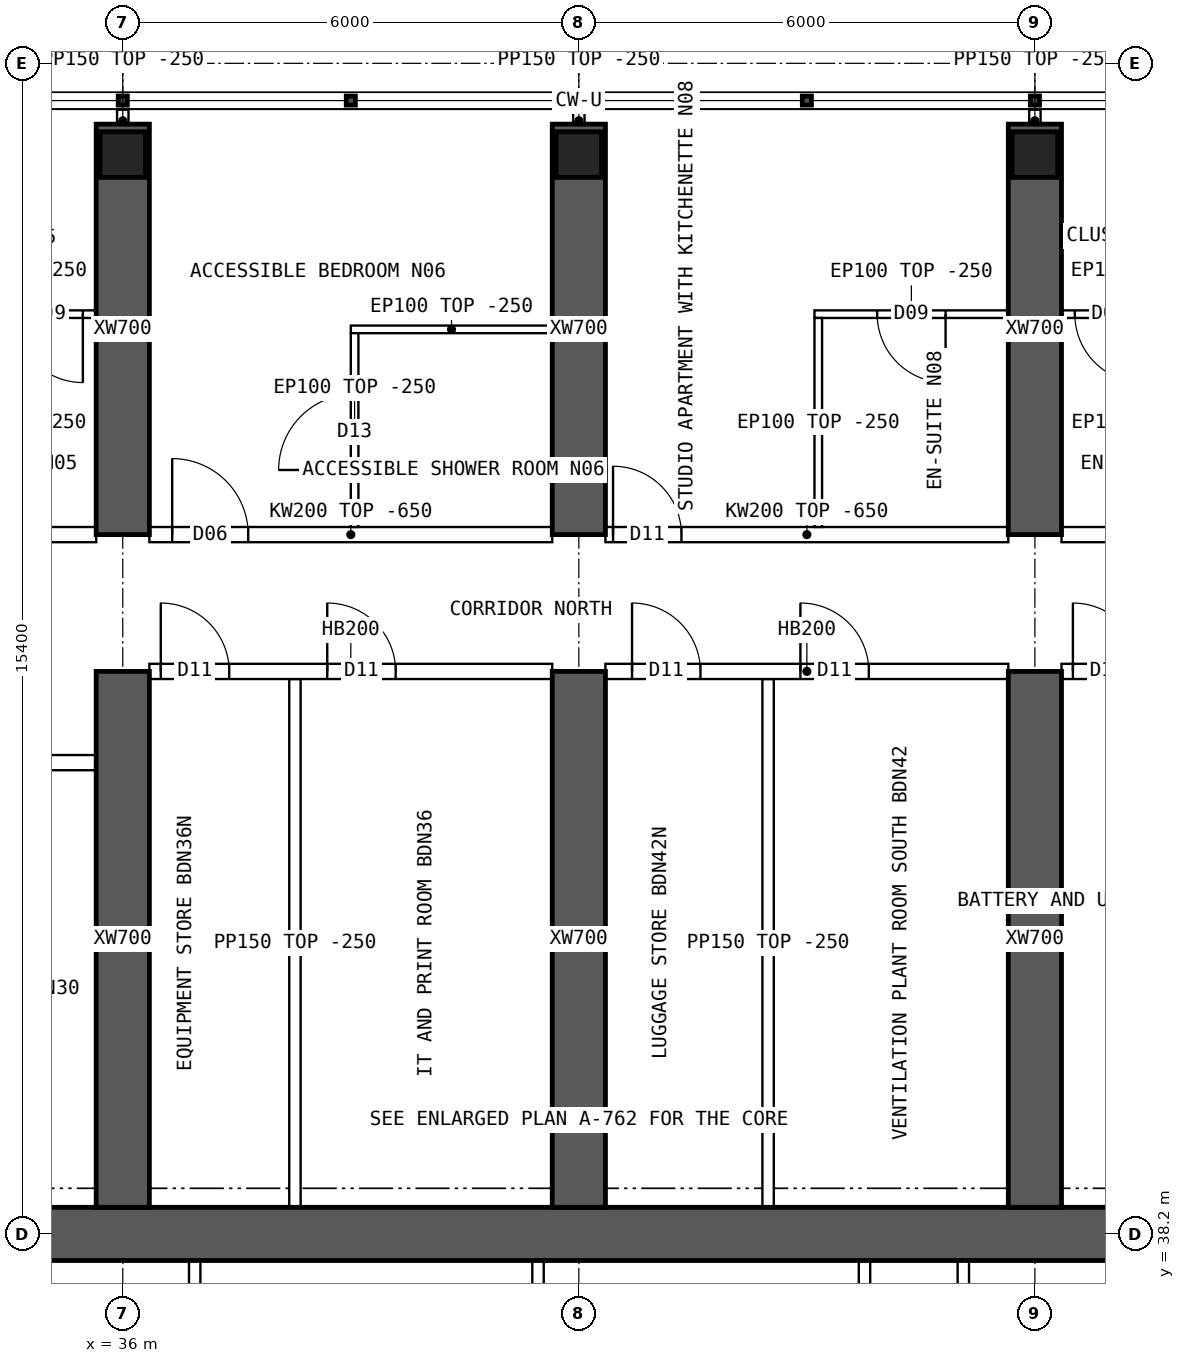
"""IFC4 building model, lengths in metres.
Left out: names, types, materials, properties, quantities, classifications, styles, units other than length and angle.
Written with IfcOpenShell. Run it as: python <this file> out.ifc"""

import sys

from ifc_helpers import new_model, si_unit, direction, frame, frame_2d, origin, origin_2d, place, context, subcontext, project, spatial, polyline, rectangle, hollow_rectangle, outline, extrude, element, fill, save


model = new_model("IFC4")
c1 = context("Model", 3, precision=1e-05, world=origin(), true_north=direction((0.0, 1.0)))
c2 = subcontext(c1, "Body", "Model", "MODEL_VIEW")
j1 = project(units=[si_unit("LENGTHUNIT", "METRE"), si_unit("PLANEANGLEUNIT", "RADIAN")], contexts=[c1])
p1 = place(None, origin())
s1 = spatial("IfcSite", under=j1, at=p1, CompositionType="ELEMENT")
p2 = place(p1, origin())
s2 = spatial("IfcBuilding", under=s1, at=p2, CompositionType="ELEMENT")
p3 = place(p2, frame((0.0, 0.0, 239.05)))
s3 = spatial("IfcBuildingStorey", under=s2, at=p3, CompositionType="ELEMENT", Elevation=239.05)
for number, where, z_axis, x_axis in (
    (1, (36.0, 52.4, 0.0), (0.0, 0.0, 1.0), (1.0, 0.0, 0.0)),
    (2, (42.0, 52.4, 0.0), (0.0, 0.0, 1.0), (1.0, 0.0, 0.0)),
    (3, (48.0, 52.4, 0.0), (0.0, 0.0, 1.0), (1.0, 0.0, 0.0)),
):
    element("IfcColumn", number, at=place(p3, frame(where, z_axis=z_axis, x_axis=x_axis)), inside=s3, PredefinedType="COLUMN", context=c2, shape_type="SweptSolid", body=[
        extrude(hollow_rectangle(XDim=0.6, YDim=0.6, WallThickness=0.06, at=origin_2d()), origin(), (0.0, 0.0, 1.0), 3.75),
    ])
p4 = place(p3, frame((18.0, 38.2, 0.0), z_axis=(0.0, 0.0, 1.0), x_axis=(1.0, 0.0, 0.0)))
e4 = element("IfcWall", 4, at=p4, inside=s3, PredefinedType="SHEAR", context=c2, shape_type="SweptSolid", body=[
    extrude(rectangle(XDim=48.0, YDim=0.7, at=frame_2d((24.0, 0.0))), origin(), (0.0, 0.0, 1.0), 3.75),
])
p5 = place(p3, frame((36.0, 47.4, 0.0), z_axis=(0.0, 0.0, 1.0), x_axis=(0.0, 1.0, 0.0)))
e5 = element("IfcWall", 5, at=p5, inside=s3, PredefinedType="SHEAR", context=c2, shape_type="SweptSolid", body=[
    extrude(rectangle(XDim=5.4, YDim=0.7, at=frame_2d((2.7, 0.0))), origin(), (0.0, 0.0, 1.0), 3.75),
])
p6 = place(p3, frame((36.0, 38.55, 0.0), z_axis=(0.0, 0.0, 1.0), x_axis=(0.0, 1.0, 0.0)))
e6 = element("IfcWall", 6, at=p6, inside=s3, PredefinedType="SHEAR", context=c2, shape_type="SweptSolid", body=[
    extrude(rectangle(XDim=7.05, YDim=0.7, at=frame_2d((3.525, 0.0))), origin(), (0.0, 0.0, 1.0), 3.75),
])
p7 = place(p3, frame((42.0, 47.4, 0.0), z_axis=(0.0, 0.0, 1.0), x_axis=(0.0, 1.0, 0.0)))
e7 = element("IfcWall", 7, at=p7, inside=s3, PredefinedType="SHEAR", context=c2, shape_type="SweptSolid", body=[
    extrude(rectangle(XDim=5.4, YDim=0.7, at=frame_2d((2.7, 0.0))), origin(), (0.0, 0.0, 1.0), 3.75),
])
p8 = place(p3, frame((42.0, 38.55, 0.0), z_axis=(0.0, 0.0, 1.0), x_axis=(0.0, 1.0, 0.0)))
e8 = element("IfcWall", 8, at=p8, inside=s3, PredefinedType="SHEAR", context=c2, shape_type="SweptSolid", body=[
    extrude(rectangle(XDim=7.05, YDim=0.7, at=frame_2d((3.525, 0.0))), origin(), (0.0, 0.0, 1.0), 3.75),
])
p9 = place(p3, frame((48.0, 47.4, 0.0), z_axis=(0.0, 0.0, 1.0), x_axis=(0.0, 1.0, 0.0)))
e9 = element("IfcWall", 9, at=p9, inside=s3, PredefinedType="SHEAR", context=c2, shape_type="SweptSolid", body=[
    extrude(rectangle(XDim=5.4, YDim=0.7, at=frame_2d((2.7, 0.0))), origin(), (0.0, 0.0, 1.0), 3.75),
])
p10 = place(p3, frame((48.0, 38.55, 0.0), z_axis=(0.0, 0.0, 1.0), x_axis=(0.0, 1.0, 0.0)))
e10 = element("IfcWall", 10, at=p10, inside=s3, PredefinedType="SHEAR", context=c2, shape_type="SweptSolid", body=[
    extrude(rectangle(XDim=7.05, YDim=0.7, at=frame_2d((3.525, 0.0))), origin(), (0.0, 0.0, 1.0), 3.75),
])
for number, where, z_axis, x_axis in (
    (11, (36.946, 34.75, 0.0), (0.0, 0.0, 1.0), (0.0, 1.0, 0.0)),
    (12, (41.463, 34.75, 0.0), (0.0, 0.0, 1.0), (0.0, 1.0, 0.0)),
    (13, (45.758, 34.75, 0.0), (0.0, 0.0, 1.0), (0.0, 1.0, 0.0)),
    (14, (47.058, 34.75, 0.0), (0.0, 0.0, 1.0), (0.0, 1.0, 0.0)),
):
    element("IfcWall", number, at=place(p3, frame(where, z_axis=z_axis, x_axis=x_axis)), inside=s3, PredefinedType="SOLIDWALL", context=c2, shape_type="SweptSolid", body=[
        extrude(rectangle(XDim=3.1, YDim=0.15, at=frame_2d((1.55, 0.0))), origin(), (0.0, 0.0, 1.0), 3.5),
    ])
p11 = place(p3, frame((30.35, 47.4, 0.0), z_axis=(0.0, 0.0, 1.0), x_axis=(1.0, 0.0, 0.0)))
e15 = element("IfcWall", 15, at=p11, inside=s3, PredefinedType="SOLIDWALL", context=c2, shape_type="SweptSolid", body=[
    extrude(outline(polyline([(0.0, 0.0), (5.3, 0.0), (5.3, 3.1), (0.0, 3.1), (0.0, 0.0)])), frame((0.0, 0.1, 0.0), z_axis=(0.0, -1.0, 0.0), x_axis=(1.0, 0.0, 0.0)), (0.0, 0.0, 1.0), 0.2),
])
p12 = place(p11, frame((0.3, 0.0, 0.0)))
e16 = element("IfcOpeningElement", 16, at=p12, cuts=e15, PredefinedType="OPENING", context=c2, shape_type="SweptSolid", body=[
    extrude(rectangle(XDim=0.9, YDim=2.1, at=frame_2d((0.45, 1.05))), frame((0.0, 0.11, 0.0), z_axis=(0.0, -1.0, 0.0), x_axis=(1.0, 0.0, 0.0)), (0.0, 0.0, 1.0), 0.22),
])
p13 = place(p3, frame((36.35, 47.4, 0.0), z_axis=(0.0, 0.0, 1.0), x_axis=(1.0, 0.0, 0.0)))
e17 = element("IfcWall", 17, at=p13, inside=s3, PredefinedType="SOLIDWALL", context=c2, shape_type="SweptSolid", body=[
    extrude(outline(polyline([(0.0, 0.0), (5.3, 0.0), (5.3, 3.1), (0.0, 3.1), (0.0, 0.0)])), frame((0.0, 0.1, 0.0), z_axis=(0.0, -1.0, 0.0), x_axis=(1.0, 0.0, 0.0)), (0.0, 0.0, 1.0), 0.2),
])
p14 = place(p13, frame((0.3, 0.0, 0.0)))
e18 = element("IfcOpeningElement", 18, at=p14, cuts=e17, PredefinedType="OPENING", context=c2, shape_type="SweptSolid", body=[
    extrude(rectangle(XDim=1.0, YDim=2.1, at=frame_2d((0.5, 1.05))), frame((0.0, 0.11, 0.0), z_axis=(0.0, -1.0, 0.0), x_axis=(1.0, 0.0, 0.0)), (0.0, 0.0, 1.0), 0.22),
])
p15 = place(p3, frame((36.35, 45.6, 0.0), z_axis=(0.0, 0.0, 1.0), x_axis=(1.0, 0.0, 0.0)))
e19 = element("IfcWall", 19, at=p15, inside=s3, PredefinedType="SOLIDWALL", context=c2, shape_type="SweptSolid", body=[
    extrude(rectangle(XDim=5.3, YDim=0.2, at=frame_2d((2.65, 0.0))), origin(), (0.0, 0.0, 1.0), 3.5),
])
p16 = place(p15, frame((0.15, 0.0, 0.0)))
e20 = element("IfcOpeningElement", 20, at=p16, cuts=e19, PredefinedType="OPENING", context=c2, shape_type="SweptSolid", body=[
    extrude(rectangle(XDim=0.9, YDim=2.1, at=frame_2d((0.45, 1.05))), frame((0.0, 0.11, 0.0), z_axis=(0.0, -1.0, 0.0), x_axis=(1.0, 0.0, 0.0)), (0.0, 0.0, 1.0), 0.22),
])
p17 = place(p15, frame((2.34, 0.0, 0.0)))
e21 = element("IfcOpeningElement", 21, at=p17, cuts=e19, PredefinedType="OPENING", context=c2, shape_type="SweptSolid", body=[
    extrude(rectangle(XDim=0.9, YDim=2.1, at=frame_2d((0.45, 1.05))), frame((0.0, 0.11, 0.0), z_axis=(0.0, -1.0, 0.0), x_axis=(1.0, 0.0, 0.0)), (0.0, 0.0, 1.0), 0.22),
])
p18 = place(p3, frame((42.35, 47.4, 0.0), z_axis=(0.0, 0.0, 1.0), x_axis=(1.0, 0.0, 0.0)))
e22 = element("IfcWall", 22, at=p18, inside=s3, PredefinedType="SOLIDWALL", context=c2, shape_type="SweptSolid", body=[
    extrude(outline(polyline([(0.0, 0.0), (5.3, 0.0), (5.3, 3.1), (0.0, 3.1), (0.0, 0.0)])), frame((0.0, 0.1, 0.0), z_axis=(0.0, -1.0, 0.0), x_axis=(1.0, 0.0, 0.0)), (0.0, 0.0, 1.0), 0.2),
])
p19 = place(p18, frame((0.1, 0.0, 0.0)))
e23 = element("IfcOpeningElement", 23, at=p19, cuts=e22, PredefinedType="OPENING", context=c2, shape_type="SweptSolid", body=[
    extrude(rectangle(XDim=0.9, YDim=2.1, at=frame_2d((0.45, 1.05))), frame((0.0, 0.11, 0.0), z_axis=(0.0, -1.0, 0.0), x_axis=(1.0, 0.0, 0.0)), (0.0, 0.0, 1.0), 0.22),
])
p20 = place(p3, frame((42.35, 45.6, 0.0), z_axis=(0.0, 0.0, 1.0), x_axis=(1.0, 0.0, 0.0)))
e24 = element("IfcWall", 24, at=p20, inside=s3, PredefinedType="SOLIDWALL", context=c2, shape_type="SweptSolid", body=[
    extrude(rectangle(XDim=5.3, YDim=0.2, at=frame_2d((2.65, 0.0))), origin(), (0.0, 0.0, 1.0), 3.5),
])
p21 = place(p20, frame((0.35, 0.0, 0.0)))
e25 = element("IfcOpeningElement", 25, at=p21, cuts=e24, PredefinedType="OPENING", context=c2, shape_type="SweptSolid", body=[
    extrude(rectangle(XDim=0.9, YDim=2.1, at=frame_2d((0.45, 1.05))), frame((0.0, 0.11, 0.0), z_axis=(0.0, -1.0, 0.0), x_axis=(1.0, 0.0, 0.0)), (0.0, 0.0, 1.0), 0.22),
])
p22 = place(p20, frame((2.565, 0.0, 0.0)))
e26 = element("IfcOpeningElement", 26, at=p22, cuts=e24, PredefinedType="OPENING", context=c2, shape_type="SweptSolid", body=[
    extrude(rectangle(XDim=0.9, YDim=2.1, at=frame_2d((0.45, 1.05))), frame((0.0, 0.11, 0.0), z_axis=(0.0, -1.0, 0.0), x_axis=(1.0, 0.0, 0.0)), (0.0, 0.0, 1.0), 0.22),
])
p23 = place(p3, frame((48.35, 47.4, 0.0), z_axis=(0.0, 0.0, 1.0), x_axis=(1.0, 0.0, 0.0)))
e27 = element("IfcWall", 27, at=p23, inside=s3, PredefinedType="SOLIDWALL", context=c2, shape_type="SweptSolid", body=[
    extrude(outline(polyline([(0.0, 0.0), (5.3, 0.0), (5.3, 3.1), (0.0, 3.1), (0.0, 0.0)])), frame((0.0, 0.1, 0.0), z_axis=(0.0, -1.0, 0.0), x_axis=(1.0, 0.0, 0.0)), (0.0, 0.0, 1.0), 0.2),
])
p24 = place(p23, frame((1.3, 0.0, 0.0)))
e28 = element("IfcOpeningElement", 28, at=p24, cuts=e27, PredefinedType="OPENING", context=c2, shape_type="SweptSolid", body=[
    extrude(rectangle(XDim=0.9, YDim=2.1, at=frame_2d((0.45, 1.05))), frame((0.0, 0.11, 0.0), z_axis=(0.0, -1.0, 0.0), x_axis=(1.0, 0.0, 0.0)), (0.0, 0.0, 1.0), 0.22),
])
p25 = place(p23, frame((2.825, 0.0, 0.0)))
e29 = element("IfcOpeningElement", 29, at=p25, cuts=e27, PredefinedType="OPENING", context=c2, shape_type="SweptSolid", body=[
    extrude(rectangle(XDim=0.9, YDim=2.1, at=frame_2d((0.45, 1.05))), frame((0.0, 0.11, 0.0), z_axis=(0.0, -1.0, 0.0), x_axis=(1.0, 0.0, 0.0)), (0.0, 0.0, 1.0), 0.22),
])
p26 = place(p3, frame((48.35, 45.6, 0.0), z_axis=(0.0, 0.0, 1.0), x_axis=(1.0, 0.0, 0.0)))
e30 = element("IfcWall", 30, at=p26, inside=s3, PredefinedType="SOLIDWALL", context=c2, shape_type="SweptSolid", body=[
    extrude(rectangle(XDim=5.3, YDim=0.2, at=frame_2d((2.65, 0.0))), origin(), (0.0, 0.0, 1.0), 3.5),
])
p27 = place(p26, frame((0.15, 0.0, 0.0)))
e31 = element("IfcOpeningElement", 31, at=p27, cuts=e30, PredefinedType="OPENING", context=c2, shape_type="SweptSolid", body=[
    extrude(rectangle(XDim=0.9, YDim=2.1, at=frame_2d((0.45, 1.05))), frame((0.0, 0.11, 0.0), z_axis=(0.0, -1.0, 0.0), x_axis=(1.0, 0.0, 0.0)), (0.0, 0.0, 1.0), 0.22),
])
p28 = place(p26, frame((2.16, 0.0, 0.0)))
e32 = element("IfcOpeningElement", 32, at=p28, cuts=e30, PredefinedType="OPENING", context=c2, shape_type="SweptSolid", body=[
    extrude(rectangle(XDim=0.9, YDim=2.1, at=frame_2d((0.45, 1.05))), frame((0.0, 0.11, 0.0), z_axis=(0.0, -1.0, 0.0), x_axis=(1.0, 0.0, 0.0)), (0.0, 0.0, 1.0), 0.22),
])
p29 = place(p3, frame((34.4, 50.3, 0.0), z_axis=(0.0, 0.0, 1.0), x_axis=(1.0, 0.0, 0.0)))
e33 = element("IfcWall", 33, at=p29, inside=s3, PredefinedType="PARTITIONING", context=c2, shape_type="SweptSolid", body=[
    extrude(rectangle(XDim=1.25, YDim=0.1, at=frame_2d((0.625, 0.0))), origin(), (0.0, 0.0, 1.0), 3.5),
])
p30 = place(p29, frame((0.175, 0.0, 0.0)))
e34 = element("IfcOpeningElement", 34, at=p30, cuts=e33, PredefinedType="OPENING", context=c2, shape_type="SweptSolid", body=[
    extrude(rectangle(XDim=0.9, YDim=2.1, at=frame_2d((0.45, 1.05))), frame((0.0, 0.06, 0.0), z_axis=(0.0, -1.0, 0.0), x_axis=(1.0, 0.0, 0.0)), (0.0, 0.0, 1.0), 0.12),
])
p31 = place(p3, frame((39.0, 50.1, 0.0), z_axis=(0.0, 0.0, 1.0), x_axis=(1.0, 0.0, 0.0)))
e35 = element("IfcWall", 35, at=p31, inside=s3, PredefinedType="PARTITIONING", context=c2, shape_type="SweptSolid", body=[
    extrude(rectangle(XDim=2.65, YDim=0.1, at=frame_2d((1.325, 0.0))), origin(), (0.0, 0.0, 1.0), 3.5),
])
p32 = place(p3, frame((39.05, 50.05, 0.0), z_axis=(0.0, 0.0, 1.0), x_axis=(0.0, -1.0, 0.0)))
e36 = element("IfcWall", 36, at=p32, inside=s3, PredefinedType="PARTITIONING", context=c2, shape_type="SweptSolid", body=[
    extrude(outline(polyline([(0.0, 0.0), (2.55, 0.0), (2.55, 3.1), (2.502, 3.1), (2.5, 3.5), (0.0, 3.5), (0.0, 0.0)])), frame((0.0, 0.05, 0.0), z_axis=(0.0, -1.0, 0.0), x_axis=(1.0, 0.0, 0.0)), (0.0, 0.0, 1.0), 0.1),
])
p33 = place(p32, frame((0.8, 0.0, 0.0)))
e37 = element("IfcOpeningElement", 37, at=p33, cuts=e36, PredefinedType="OPENING", context=c2, shape_type="SweptSolid", body=[
    extrude(rectangle(XDim=1.0, YDim=2.1, at=frame_2d((0.5, 1.05))), frame((0.0, 0.06, 0.0), z_axis=(0.0, -1.0, 0.0), x_axis=(1.0, 0.0, 0.0)), (0.0, 0.0, 1.0), 0.12),
])
p34 = place(p3, frame((45.1, 50.3, 0.0), z_axis=(0.0, 0.0, 1.0), x_axis=(1.0, 0.0, 0.0)))
e38 = element("IfcWall", 38, at=p34, inside=s3, PredefinedType="PARTITIONING", context=c2, shape_type="SweptSolid", body=[
    extrude(rectangle(XDim=2.55, YDim=0.1, at=frame_2d((1.275, 0.0))), origin(), (0.0, 0.0, 1.0), 3.5),
])
p35 = place(p34, frame((0.825, 0.0, 0.0)))
e39 = element("IfcOpeningElement", 39, at=p35, cuts=e38, PredefinedType="OPENING", context=c2, shape_type="SweptSolid", body=[
    extrude(rectangle(XDim=0.9, YDim=2.1, at=frame_2d((0.45, 1.05))), frame((0.0, 0.06, 0.0), z_axis=(0.0, -1.0, 0.0), x_axis=(1.0, 0.0, 0.0)), (0.0, 0.0, 1.0), 0.12),
])
p36 = place(p3, frame((45.15, 50.25, 0.0), z_axis=(0.0, 0.0, 1.0), x_axis=(0.0, -1.0, 0.0)))
e40 = element("IfcWall", 40, at=p36, inside=s3, PredefinedType="PARTITIONING", context=c2, shape_type="SweptSolid", body=[
    extrude(outline(polyline([(0.0, 0.0), (2.75, 0.0), (2.75, 3.1), (2.702, 3.1), (2.7, 3.5), (0.0, 3.5), (0.0, 0.0)])), frame((0.0, 0.05, 0.0), z_axis=(0.0, -1.0, 0.0), x_axis=(1.0, 0.0, 0.0)), (0.0, 0.0, 1.0), 0.1),
])
p37 = place(p3, frame((48.35, 50.3, 0.0), z_axis=(0.0, 0.0, 1.0), x_axis=(1.0, 0.0, 0.0)))
e41 = element("IfcWall", 41, at=p37, inside=s3, PredefinedType="PARTITIONING", context=c2, shape_type="SweptSolid", body=[
    extrude(rectangle(XDim=1.25, YDim=0.1, at=frame_2d((0.625, 0.0))), origin(), (0.0, 0.0, 1.0), 3.5),
])
p38 = place(p37, frame((0.175, 0.0, 0.0)))
e42 = element("IfcOpeningElement", 42, at=p38, cuts=e41, PredefinedType="OPENING", context=c2, shape_type="SweptSolid", body=[
    extrude(rectangle(XDim=0.9, YDim=2.1, at=frame_2d((0.45, 1.05))), frame((0.0, 0.06, 0.0), z_axis=(0.0, -1.0, 0.0), x_axis=(1.0, 0.0, 0.0)), (0.0, 0.0, 1.0), 0.12),
])
p39 = place(p3, frame((30.35, 44.4, 0.0), z_axis=(0.0, 0.0, 1.0), x_axis=(1.0, 0.0, 0.0)))
e43 = element("IfcWall", 43, at=p39, inside=s3, PredefinedType="SOLIDWALL", context=c2, shape_type="SweptSolid", body=[
    extrude(rectangle(XDim=5.3, YDim=0.2, at=frame_2d((2.65, 0.0))), origin(), (0.0, 0.0, 1.0), 3.5),
])
p40 = place(p39, frame((0.8, 0.0, 0.0)))
e44 = element("IfcOpeningElement", 44, at=p40, cuts=e43, PredefinedType="OPENING", context=c2, shape_type="SweptSolid", body=[
    extrude(rectangle(XDim=1.0, YDim=2.1, at=frame_2d((0.5, 1.05))), frame((0.0, 0.11, 0.0), z_axis=(0.0, -1.0, 0.0), x_axis=(1.0, 0.0, 0.0)), (0.0, 0.0, 1.0), 0.22),
])
for number, where, z_axis, x_axis in (
    (45, (38.265, 38.55, 0.0), (0.0, 0.0, 1.0), (0.0, 1.0, 0.0)),
    (46, (44.49, 38.55, 0.0), (0.0, 0.0, 1.0), (0.0, 1.0, 0.0)),
):
    element("IfcWall", number, at=place(p3, frame(where, z_axis=z_axis, x_axis=x_axis)), inside=s3, PredefinedType="PARTITIONING", context=c2, shape_type="SweptSolid", body=[
        extrude(rectangle(XDim=6.95, YDim=0.15, at=frame_2d((3.475, 0.0))), origin(), (0.0, 0.0, 1.0), 3.5),
    ])
for number, where, z_axis, x_axis in (
    (47, (36.0, 52.7, 0.0), (0.0, 0.0, 1.0), (0.0, 1.0, 0.0)),
    (48, (42.0, 52.7, 0.0), (0.0, 0.0, 1.0), (0.0, 1.0, 0.0)),
    (49, (48.0, 52.7, 0.0), (0.0, 0.0, 1.0), (0.0, 1.0, 0.0)),
):
    element("IfcWall", number, at=place(p3, frame(where, z_axis=z_axis, x_axis=x_axis)), inside=s3, PredefinedType="PARTITIONING", context=c2, shape_type="SweptSolid", body=[
        extrude(rectangle(XDim=0.29, YDim=0.15, at=frame_2d((0.145, 0.0))), origin(), (0.0, 0.0, 1.0), 3.5),
    ])
p41 = place(p30, origin())
e50 = element("IfcDoor", 50, at=p41, inside=s3, OperationType="SINGLE_SWING_RIGHT", PredefinedType="DOOR", context=c2, shape_type="SweptSolid", body=[
    extrude(rectangle(XDim=0.9, YDim=2.1, at=frame_2d((0.45, 1.05))), frame((0.0, 0.025, 0.0), z_axis=(0.0, -1.0, 0.0), x_axis=(1.0, 0.0, 0.0)), (0.0, 0.0, 1.0), 0.05),
])
fill(e34, e50)
p42 = place(p33, origin())
e51 = element("IfcDoor", 51, at=p42, inside=s3, OperationType="SINGLE_SWING_RIGHT", PredefinedType="DOOR", context=c2, shape_type="SweptSolid", body=[
    extrude(rectangle(XDim=1.0, YDim=2.1, at=frame_2d((0.5, 1.05))), frame((0.0, 0.025, 0.0), z_axis=(0.0, -1.0, 0.0), x_axis=(1.0, 0.0, 0.0)), (0.0, 0.0, 1.0), 0.05),
])
fill(e37, e51)
p43 = place(p14, origin())
e52 = element("IfcDoor", 52, at=p43, inside=s3, OperationType="SINGLE_SWING_LEFT", PredefinedType="DOOR", context=c2, shape_type="SweptSolid", body=[
    extrude(rectangle(XDim=1.0, YDim=2.1, at=frame_2d((0.5, 1.05))), frame((0.0, 0.025, 0.0), z_axis=(0.0, -1.0, 0.0), x_axis=(1.0, 0.0, 0.0)), (0.0, 0.0, 1.0), 0.05),
])
fill(e18, e52)
p44 = place(p35, origin())
e53 = element("IfcDoor", 53, at=p44, inside=s3, OperationType="SINGLE_SWING_RIGHT", PredefinedType="DOOR", context=c2, shape_type="SweptSolid", body=[
    extrude(rectangle(XDim=0.9, YDim=2.1, at=frame_2d((0.45, 1.05))), frame((0.0, 0.025, 0.0), z_axis=(0.0, -1.0, 0.0), x_axis=(1.0, 0.0, 0.0)), (0.0, 0.0, 1.0), 0.05),
])
fill(e39, e53)
p45 = place(p19, origin())
e54 = element("IfcDoor", 54, at=p45, inside=s3, OperationType="SINGLE_SWING_LEFT", PredefinedType="DOOR", context=c2, shape_type="SweptSolid", body=[
    extrude(rectangle(XDim=0.9, YDim=2.1, at=frame_2d((0.45, 1.05))), frame((0.0, 0.025, 0.0), z_axis=(0.0, -1.0, 0.0), x_axis=(1.0, 0.0, 0.0)), (0.0, 0.0, 1.0), 0.05),
])
fill(e23, e54)
p46 = place(p38, origin())
e55 = element("IfcDoor", 55, at=p46, inside=s3, OperationType="SINGLE_SWING_RIGHT", PredefinedType="DOOR", context=c2, shape_type="SweptSolid", body=[
    extrude(rectangle(XDim=0.9, YDim=2.1, at=frame_2d((0.45, 1.05))), frame((0.0, 0.025, 0.0), z_axis=(0.0, -1.0, 0.0), x_axis=(1.0, 0.0, 0.0)), (0.0, 0.0, 1.0), 0.05),
])
fill(e42, e55)
p47 = place(p16, origin())
e56 = element("IfcDoor", 56, at=p47, inside=s3, OperationType="SINGLE_SWING_LEFT", PredefinedType="DOOR", context=c2, shape_type="SweptSolid", body=[
    extrude(rectangle(XDim=0.9, YDim=2.1, at=frame_2d((0.45, 1.05))), frame((0.0, 0.025, 0.0), z_axis=(0.0, -1.0, 0.0), x_axis=(1.0, 0.0, 0.0)), (0.0, 0.0, 1.0), 0.05),
])
fill(e20, e56)
p48 = place(p17, origin())
e57 = element("IfcDoor", 57, at=p48, inside=s3, OperationType="SINGLE_SWING_LEFT", PredefinedType="DOOR", context=c2, shape_type="SweptSolid", body=[
    extrude(rectangle(XDim=0.9, YDim=2.1, at=frame_2d((0.45, 1.05))), frame((0.0, 0.025, 0.0), z_axis=(0.0, -1.0, 0.0), x_axis=(1.0, 0.0, 0.0)), (0.0, 0.0, 1.0), 0.05),
])
fill(e21, e57)
p49 = place(p21, origin())
e58 = element("IfcDoor", 58, at=p49, inside=s3, OperationType="SINGLE_SWING_LEFT", PredefinedType="DOOR", context=c2, shape_type="SweptSolid", body=[
    extrude(rectangle(XDim=0.9, YDim=2.1, at=frame_2d((0.45, 1.05))), frame((0.0, 0.025, 0.0), z_axis=(0.0, -1.0, 0.0), x_axis=(1.0, 0.0, 0.0)), (0.0, 0.0, 1.0), 0.05),
])
fill(e25, e58)
p50 = place(p22, origin())
e59 = element("IfcDoor", 59, at=p50, inside=s3, OperationType="SINGLE_SWING_LEFT", PredefinedType="DOOR", context=c2, shape_type="SweptSolid", body=[
    extrude(rectangle(XDim=0.9, YDim=2.1, at=frame_2d((0.45, 1.05))), frame((0.0, 0.025, 0.0), z_axis=(0.0, -1.0, 0.0), x_axis=(1.0, 0.0, 0.0)), (0.0, 0.0, 1.0), 0.05),
])
fill(e26, e59)
p51 = place(p27, origin())
e60 = element("IfcDoor", 60, at=p51, inside=s3, OperationType="SINGLE_SWING_LEFT", PredefinedType="DOOR", context=c2, shape_type="SweptSolid", body=[
    extrude(rectangle(XDim=0.9, YDim=2.1, at=frame_2d((0.45, 1.05))), frame((0.0, 0.025, 0.0), z_axis=(0.0, -1.0, 0.0), x_axis=(1.0, 0.0, 0.0)), (0.0, 0.0, 1.0), 0.05),
])
fill(e31, e60)
save(model, sys.argv[1])
